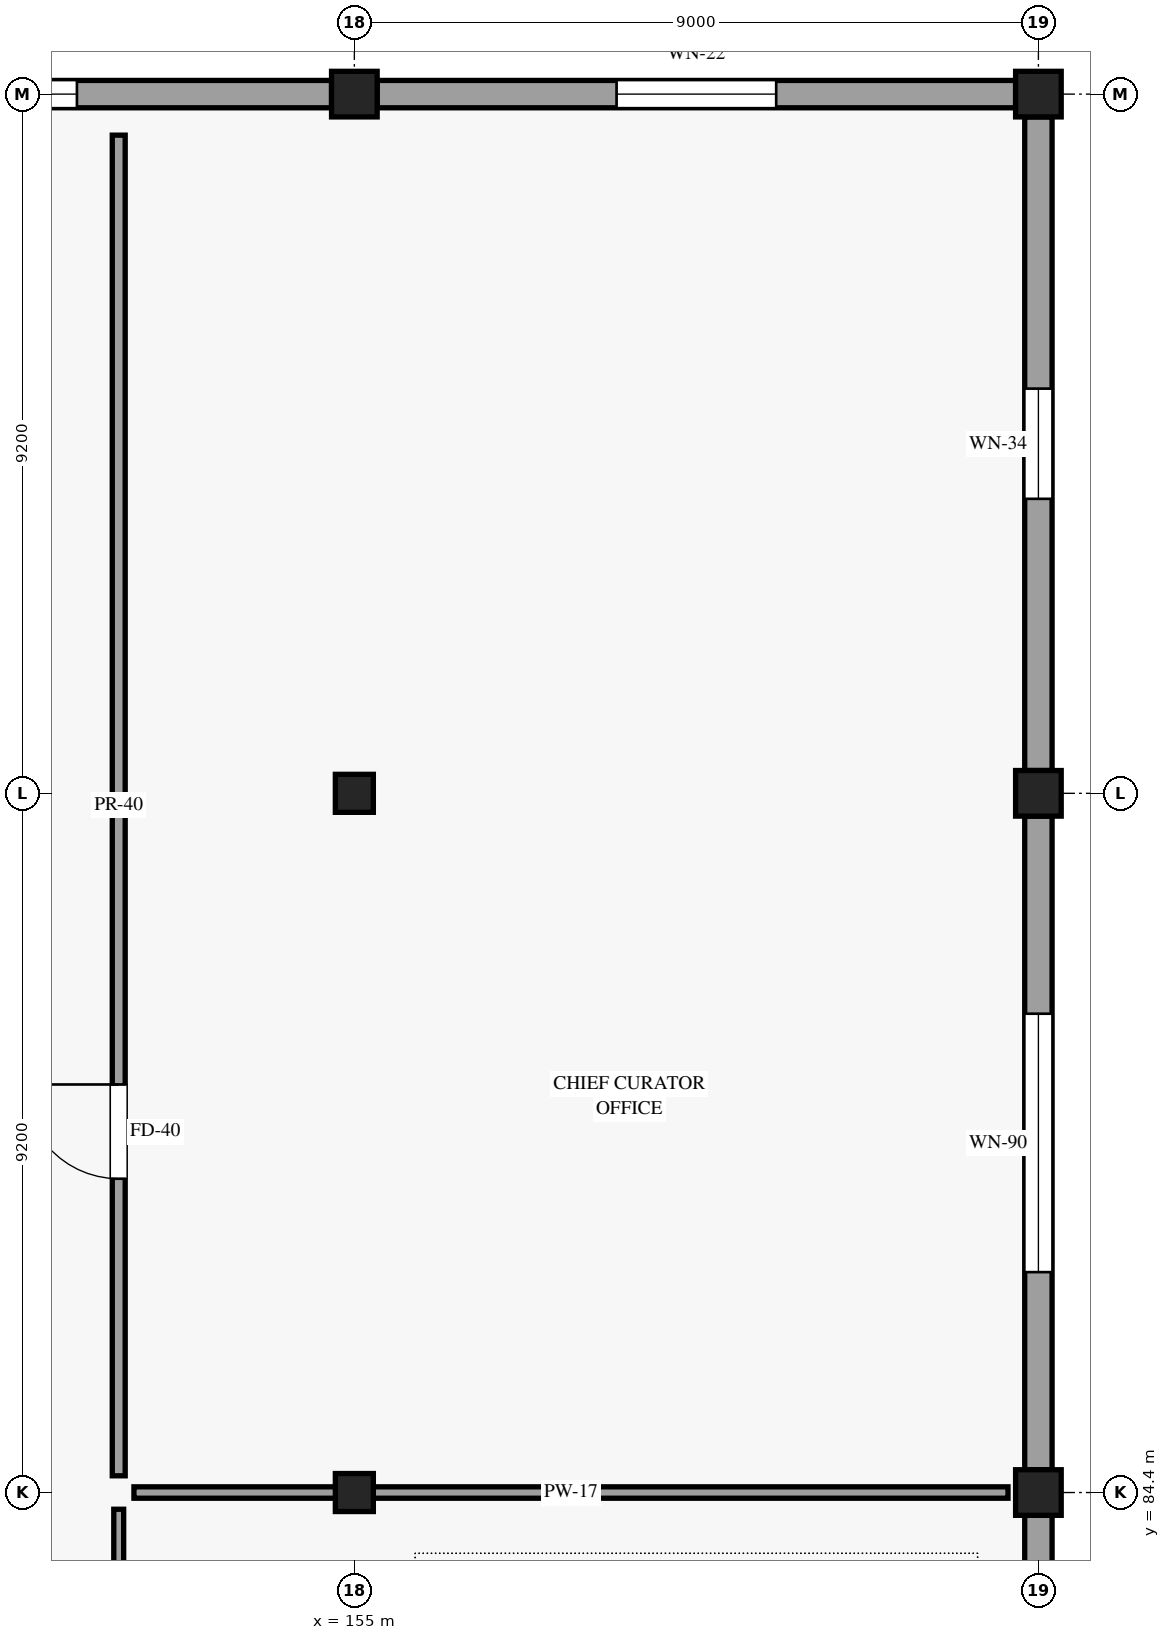
"""IFC4 building model, lengths in metres.
Left out: names, types, materials, properties, quantities, classifications, styles, units other than length and angle.
Written with IfcOpenShell. Run it as: python <this file> out.ifc"""

import sys

from ifc_helpers import new_model, si_unit, direction, frame, frame_2d, origin, origin_2d, place, context, subcontext, project, spatial, rectangle, extrude, element, fill, save


model = new_model("IFC4")
c1 = context("Model", 3, precision=1e-05, world=origin(), true_north=direction((0.0, 1.0)))
c2 = subcontext(c1, "Body", "Model", "MODEL_VIEW")
j1 = project(units=[si_unit("LENGTHUNIT", "METRE"), si_unit("PLANEANGLEUNIT", "RADIAN")], contexts=[c1])
p1 = place(None, origin())
s1 = spatial("IfcSite", under=j1, at=p1, CompositionType="ELEMENT")
p2 = place(p1, origin())
s2 = spatial("IfcBuilding", under=s1, at=p2, CompositionType="ELEMENT")
p3 = place(p2, frame((0.0, 0.0, 15.0)))
s3 = spatial("IfcBuildingStorey", under=s2, at=p3, CompositionType="ELEMENT", Elevation=15.0)
for number, where, z_axis, x_axis in (
    (1, (155.0, 84.4, 0.0), (0.0, 0.0, 1.0), (1.0, 0.0, 0.0)),
    (2, (155.0, 93.6, 0.0), (0.0, 0.0, 1.0), (1.0, 0.0, 0.0)),
):
    element("IfcColumn", number, at=place(p3, frame(where, z_axis=z_axis, x_axis=x_axis)), inside=s3, PredefinedType="COLUMN", context=c2, shape_type="SweptSolid", body=[
        extrude(rectangle(XDim=0.5, YDim=0.5, at=origin_2d()), origin(), (0.0, 0.0, 1.0), 4.5),
    ])
for number, where, z_axis, x_axis in (
    (3, (155.0, 102.8, 0.0), (0.0, 0.0, 1.0), (1.0, 0.0, 0.0)),
    (4, (164.0, 84.4, 0.0), (0.0, 0.0, 1.0), (1.0, 0.0, 0.0)),
    (5, (164.0, 93.6, 0.0), (0.0, 0.0, 1.0), (1.0, 0.0, 0.0)),
    (6, (164.0, 102.8, 0.0), (0.0, 0.0, 1.0), (1.0, 0.0, 0.0)),
):
    element("IfcColumn", number, at=place(p3, frame(where, z_axis=z_axis, x_axis=x_axis)), inside=s3, PredefinedType="COLUMN", context=c2, shape_type="SweptSolid", body=[
        extrude(rectangle(XDim=0.6, YDim=0.6, at=origin_2d()), origin(), (0.0, 0.0, 1.0), 4.5),
    ])
p4 = place(p3, frame((146.3, 102.8, 0.0), z_axis=(0.0, 0.0, 1.0), x_axis=(1.0, 0.0, 0.0)))
e7 = element("IfcWall", 7, at=p4, inside=s3, PredefinedType="STANDARD", context=c2, shape_type="SweptSolid", body=[
    extrude(rectangle(XDim=8.4, YDim=0.36, at=frame_2d((4.2, 0.0))), origin(), (0.0, 0.0, 1.0), 3.725),
])
p5 = place(p4, frame((3.35, 0.0, 0.85)))
e8 = element("IfcOpeningElement", 8, at=p5, cuts=e7, PredefinedType="OPENING", context=c2, shape_type="SweptSolid", body=[
    extrude(rectangle(XDim=1.7, YDim=2.3, at=frame_2d((0.85, 1.15))), frame((0.0, 0.19, 0.0), z_axis=(0.0, -1.0, 0.0), x_axis=(1.0, 0.0, 0.0)), (0.0, 0.0, 1.0), 0.38),
])
p6 = place(p3, frame((155.3, 102.8, 0.0), z_axis=(0.0, 0.0, 1.0), x_axis=(1.0, 0.0, 0.0)))
e9 = element("IfcWall", 9, at=p6, inside=s3, PredefinedType="STANDARD", context=c2, shape_type="SweptSolid", body=[
    extrude(rectangle(XDim=8.4, YDim=0.36, at=frame_2d((4.2, 0.0))), origin(), (0.0, 0.0, 1.0), 3.725),
])
p7 = place(p6, frame((3.15, 0.0, 0.85)))
e10 = element("IfcOpeningElement", 10, at=p7, cuts=e9, PredefinedType="OPENING", context=c2, shape_type="SweptSolid", body=[
    extrude(rectangle(XDim=2.1, YDim=2.45, at=frame_2d((1.05, 1.225))), frame((0.0, 0.19, 0.0), z_axis=(0.0, -1.0, 0.0), x_axis=(1.0, 0.0, 0.0)), (0.0, 0.0, 1.0), 0.38),
])
p8 = place(p3, frame((164.0, 75.5, 0.0), z_axis=(0.0, 0.0, 1.0), x_axis=(0.0, 1.0, 0.0)))
e11 = element("IfcWall", 11, at=p8, inside=s3, PredefinedType="STANDARD", context=c2, shape_type="SweptSolid", body=[
    extrude(rectangle(XDim=8.6, YDim=0.36, at=frame_2d((4.3, 0.0))), origin(), (0.0, 0.0, 1.0), 3.725),
])
p9 = place(p8, frame((5.75, 0.0, 0.85), z_axis=(0.0, 0.0, 1.0), x_axis=(-1.0, 0.0, 0.0)))
e12 = element("IfcOpeningElement", 12, at=p9, cuts=e11, PredefinedType="OPENING", context=c2, shape_type="SweptSolid", body=[
    extrude(rectangle(XDim=2.9, YDim=2.25, at=frame_2d((1.45, 1.125))), frame((0.0, 0.19, 0.0), z_axis=(0.0, -1.0, 0.0), x_axis=(1.0, 0.0, 0.0)), (0.0, 0.0, 1.0), 0.38),
])
p10 = place(p3, frame((164.0, 84.7, 0.0), z_axis=(0.0, 0.0, 1.0), x_axis=(0.0, 1.0, 0.0)))
e13 = element("IfcWall", 13, at=p10, inside=s3, PredefinedType="STANDARD", context=c2, shape_type="SweptSolid", body=[
    extrude(rectangle(XDim=8.6, YDim=0.36, at=frame_2d((4.3, 0.0))), origin(), (0.0, 0.0, 1.0), 3.725),
])
p11 = place(p10, frame((6.0, 0.0, 0.85), z_axis=(0.0, 0.0, 1.0), x_axis=(-1.0, 0.0, 0.0)))
e14 = element("IfcOpeningElement", 14, at=p11, cuts=e13, PredefinedType="OPENING", context=c2, shape_type="SweptSolid", body=[
    extrude(rectangle(XDim=3.4, YDim=2.4, at=frame_2d((1.7, 1.2))), frame((0.0, 0.19, 0.0), z_axis=(0.0, -1.0, 0.0), x_axis=(1.0, 0.0, 0.0)), (0.0, 0.0, 1.0), 0.38),
])
p12 = place(p3, frame((164.0, 93.9, 0.0), z_axis=(0.0, 0.0, 1.0), x_axis=(0.0, 1.0, 0.0)))
e15 = element("IfcWall", 15, at=p12, inside=s3, PredefinedType="STANDARD", context=c2, shape_type="SweptSolid", body=[
    extrude(rectangle(XDim=8.6, YDim=0.36, at=frame_2d((4.3, 0.0))), origin(), (0.0, 0.0, 1.0), 3.725),
])
p13 = place(p12, frame((5.025, 0.0, 0.85), z_axis=(0.0, 0.0, 1.0), x_axis=(-1.0, 0.0, 0.0)))
e16 = element("IfcOpeningElement", 16, at=p13, cuts=e15, PredefinedType="OPENING", context=c2, shape_type="SweptSolid", body=[
    extrude(rectangle(XDim=1.45, YDim=1.85, at=frame_2d((0.725, 0.925))), frame((0.0, 0.19, 0.0), z_axis=(0.0, -1.0, 0.0), x_axis=(1.0, 0.0, 0.0)), (0.0, 0.0, 1.0), 0.38),
])
p14 = place(p3, frame((151.9, 75.42, 0.0), z_axis=(0.0, 0.0, 1.0), x_axis=(0.0, 1.0, 0.0)))
e17 = element("IfcWall", 17, at=p14, inside=s3, PredefinedType="PARTITIONING", context=c2, shape_type="SweptSolid", body=[
    extrude(rectangle(XDim=8.76, YDim=0.13, at=frame_2d((4.38, 0.0))), origin(), (0.0, 0.0, 1.0), 3.725),
])
p15 = place(p14, frame((3.88, 0.0, 0.0)))
e18 = element("IfcOpeningElement", 18, at=p15, cuts=e17, PredefinedType="OPENING", context=c2, shape_type="SweptSolid", body=[
    extrude(rectangle(XDim=1.16, YDim=2.28, at=frame_2d((0.58, 1.14))), frame((0.0, 0.075, 0.0), z_axis=(0.0, -1.0, 0.0), x_axis=(1.0, 0.0, 0.0)), (0.0, 0.0, 1.0), 0.15),
])
p16 = place(p3, frame((152.1, 84.4, 0.0), z_axis=(0.0, 0.0, 1.0), x_axis=(1.0, 0.0, 0.0)))
e19 = element("IfcWall", 19, at=p16, inside=s3, PredefinedType="PARTITIONING", context=c2, shape_type="SweptSolid", body=[
    extrude(rectangle(XDim=11.5, YDim=0.15, at=frame_2d((5.75, 0.0))), origin(), (0.0, 0.0, 1.0), 3.725),
])
p17 = place(p3, frame((151.9, 84.62, 0.0), z_axis=(0.0, 0.0, 1.0), x_axis=(0.0, 1.0, 0.0)))
e20 = element("IfcWall", 20, at=p17, inside=s3, PredefinedType="PARTITIONING", context=c2, shape_type="SweptSolid", body=[
    extrude(rectangle(XDim=17.64, YDim=0.17, at=frame_2d((8.82, 0.0))), origin(), (0.0, 0.0, 1.0), 3.725),
])
p18 = place(p17, frame((3.909, 0.0, 0.0)))
e21 = element("IfcOpeningElement", 21, at=p18, cuts=e20, PredefinedType="OPENING", context=c2, shape_type="SweptSolid", body=[
    extrude(rectangle(XDim=1.24, YDim=2.32, at=frame_2d((0.62, 1.16))), frame((0.0, 0.095, 0.0), z_axis=(0.0, -1.0, 0.0), x_axis=(1.0, 0.0, 0.0)), (0.0, 0.0, 1.0), 0.19),
])
p19 = place(p5, origin())
e22 = element("IfcWindow", 22, at=p19, inside=s3, PartitioningType="SINGLE_PANEL", PredefinedType="WINDOW", context=c2, shape_type="SweptSolid", body=[
    extrude(rectangle(XDim=1.7, YDim=2.3, at=frame_2d((0.85, 1.15))), frame((0.0, 0.03, 0.0), z_axis=(0.0, -1.0, 0.0), x_axis=(1.0, 0.0, 0.0)), (0.0, 0.0, 1.0), 0.06),
])
fill(e8, e22)
p20 = place(p7, origin())
e23 = element("IfcWindow", 23, at=p20, inside=s3, PartitioningType="SINGLE_PANEL", PredefinedType="WINDOW", context=c2, shape_type="SweptSolid", body=[
    extrude(rectangle(XDim=2.1, YDim=2.45, at=frame_2d((1.05, 1.225))), frame((0.0, 0.03, 0.0), z_axis=(0.0, -1.0, 0.0), x_axis=(1.0, 0.0, 0.0)), (0.0, 0.0, 1.0), 0.06),
])
fill(e10, e23)
p21 = place(p11, origin())
e24 = element("IfcWindow", 24, at=p21, inside=s3, PartitioningType="SINGLE_PANEL", PredefinedType="WINDOW", context=c2, shape_type="SweptSolid", body=[
    extrude(rectangle(XDim=3.4, YDim=2.4, at=frame_2d((1.7, 1.2))), frame((0.0, 0.03, 0.0), z_axis=(0.0, -1.0, 0.0), x_axis=(1.0, 0.0, 0.0)), (0.0, 0.0, 1.0), 0.06),
])
fill(e14, e24)
p22 = place(p13, origin())
e25 = element("IfcWindow", 25, at=p22, inside=s3, PartitioningType="SINGLE_PANEL", PredefinedType="WINDOW", context=c2, shape_type="SweptSolid", body=[
    extrude(rectangle(XDim=1.45, YDim=1.85, at=frame_2d((0.725, 0.925))), frame((0.0, 0.03, 0.0), z_axis=(0.0, -1.0, 0.0), x_axis=(1.0, 0.0, 0.0)), (0.0, 0.0, 1.0), 0.06),
])
fill(e16, e25)
p23 = place(p18, origin())
e26 = element("IfcDoor", 26, at=p23, inside=s3, OperationType="SINGLE_SWING_RIGHT", PredefinedType="DOOR", context=c2, shape_type="SweptSolid", body=[
    extrude(rectangle(XDim=1.24, YDim=2.32, at=frame_2d((0.62, 1.16))), frame((0.0, 0.025, 0.0), z_axis=(0.0, -1.0, 0.0), x_axis=(1.0, 0.0, 0.0)), (0.0, 0.0, 1.0), 0.05),
])
fill(e21, e26)
save(model, sys.argv[1])
